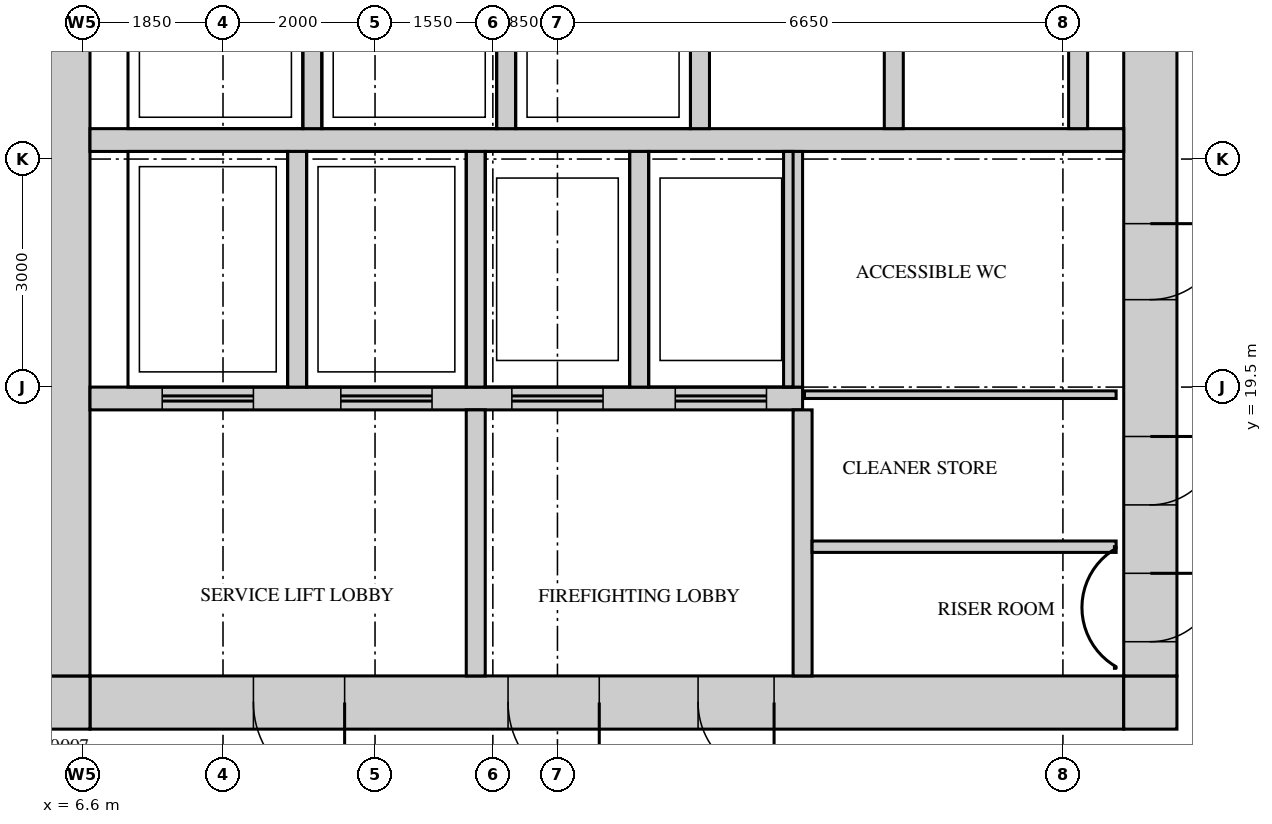
"""IFC4 building model, lengths in metres.
Left out: names, types, materials, properties, quantities, classifications, styles, units other than length and angle.
Written with IfcOpenShell. Run it as: python <this file> out.ifc"""

import sys

from ifc_helpers import new_model, si_unit, direction, frame, frame_2d, origin, place, context, subcontext, project, spatial, rectangle, extrude, source, transform, mapped, element, fill, save


model = new_model("IFC4")
c1 = context("Model", 3, precision=1e-05, world=origin(), true_north=direction((0.0, 1.0)))
c2 = subcontext(c1, "Body", "Model", "MODEL_VIEW")
j1 = project(units=[si_unit("LENGTHUNIT", "METRE"), si_unit("PLANEANGLEUNIT", "RADIAN")], contexts=[c1])
p1 = place(None, origin())
s1 = spatial("IfcSite", under=j1, at=p1, CompositionType="ELEMENT")
p2 = place(p1, origin())
s2 = spatial("IfcBuilding", under=s1, at=p2, CompositionType="ELEMENT")
p3 = place(p2, frame((0.0, 0.0, 262.2)))
s3 = spatial("IfcBuildingStorey", under=s2, at=p3, CompositionType="ELEMENT", Elevation=262.2)
m1 = source(origin(), c2, "Body", "SweptSolid", [
    extrude(rectangle(XDim=13.6, YDim=0.7, at=frame_2d((6.8, 0.0))), origin(), (0.0, 0.0, 1.0), 3.75),
])
p4 = place(p3, frame((6.7, 15.35, 0.0), z_axis=(0.0, 0.0, 1.0), x_axis=(1.0, 0.0, 0.0)))
e1 = element("IfcWall", 1, at=p4, inside=s3, PredefinedType="SHEAR", context=c2, shape_type="MappedRepresentation", body=[
    mapped(m1, transform((0.0, 0.0, 0.0))),
])
m2 = source(origin(), c2, "Body", "SweptSolid", [
    extrude(rectangle(XDim=1.2, YDim=2.1, at=frame_2d((0.6, 1.05))), frame((0.0, 0.36, 0.0), z_axis=(0.0, -1.0, 0.0), x_axis=(1.0, 0.0, 0.0)), (0.0, 0.0, 1.0), 0.72),
])
p5 = place(p4, frame((5.5, 0.0, 0.0)))
e2 = element("IfcOpeningElement", 2, at=p5, cuts=e1, PredefinedType="OPENING", context=c2, shape_type="MappedRepresentation", body=[
    mapped(m2, transform((0.0, 0.0, 0.0))),
])
p6 = place(p4, frame((2.15, 0.0, 0.0)))
e3 = element("IfcOpeningElement", 3, at=p6, cuts=e1, PredefinedType="OPENING", context=c2, shape_type="MappedRepresentation", body=[
    mapped(m2, transform((0.0, 0.0, 0.0))),
])
m3 = source(origin(), c2, "Body", "SweptSolid", [
    extrude(rectangle(XDim=1.0, YDim=2.1, at=frame_2d((0.5, 1.05))), frame((0.0, 0.36, 0.0), z_axis=(0.0, -1.0, 0.0), x_axis=(1.0, 0.0, 0.0)), (0.0, 0.0, 1.0), 0.72),
])
p7 = place(p4, frame((8.0, 0.0, 0.0)))
e4 = element("IfcOpeningElement", 4, at=p7, cuts=e1, PredefinedType="OPENING", context=c2, shape_type="MappedRepresentation", body=[
    mapped(m3, transform((0.0, 0.0, 0.0))),
])
m4 = source(origin(), c2, "Body", "SweptSolid", [
    extrude(rectangle(XDim=0.7, YDim=0.7, at=frame_2d((0.35, 0.0))), origin(), (0.0, 0.0, 1.0), 3.75),
])
for number, where, z_axis, x_axis in (
    (5, (20.3, 15.35, 0.0), (0.0, 0.0, 1.0), (1.0, 0.0, 0.0)),
    (6, (6.0, 15.35, 0.0), (0.0, 0.0, 1.0), (1.0, 0.0, 0.0)),
):
    element("IfcWall", number, at=place(p3, frame(where, z_axis=z_axis, x_axis=x_axis)), inside=s3, PredefinedType="SHEAR", context=c2, shape_type="MappedRepresentation", body=[
        mapped(m4, transform((0.0, 0.0, 0.0))),
    ])
m5 = source(origin(), c2, "Body", "SweptSolid", [
    extrude(rectangle(XDim=22.6, YDim=0.7, at=frame_2d((11.3, 0.0))), origin(), (0.0, 0.0, 1.0), 3.75),
])
p8 = place(p3, frame((20.65, 15.7, 0.0), z_axis=(0.0, 0.0, 1.0), x_axis=(0.0, 1.0, 0.0)))
e7 = element("IfcWall", 7, at=p8, inside=s3, PredefinedType="SHEAR", context=c2, shape_type="MappedRepresentation", body=[
    mapped(m5, transform((0.0, 0.0, 0.0))),
])
m6 = source(origin(), c2, "Body", "SweptSolid", [
    extrude(rectangle(XDim=1.8, YDim=2.1, at=frame_2d((0.9, 1.05))), frame((0.0, 0.36, 0.0), z_axis=(0.0, -1.0, 0.0), x_axis=(1.0, 0.0, 0.0)), (0.0, 0.0, 1.0), 0.72),
])
p9 = place(p8, frame((10.8, 0.0, 0.0)))
e8 = element("IfcOpeningElement", 8, at=p9, cuts=e7, PredefinedType="OPENING", context=c2, shape_type="MappedRepresentation", body=[
    mapped(m6, transform((0.0, 0.0, 0.0))),
])
m7 = source(origin(), c2, "Body", "SweptSolid", [
    extrude(rectangle(XDim=0.9, YDim=2.1, at=frame_2d((0.45, 1.05))), frame((0.0, 0.36, 0.0), z_axis=(0.0, -1.0, 0.0), x_axis=(1.0, 0.0, 0.0)), (0.0, 0.0, 1.0), 0.72),
])
p10 = place(p8, frame((0.45, 0.0, 0.0)))
e9 = element("IfcOpeningElement", 9, at=p10, cuts=e7, PredefinedType="OPENING", context=c2, shape_type="MappedRepresentation", body=[
    mapped(m7, transform((0.0, 0.0, 0.0))),
])
p11 = place(p8, frame((2.25, 0.0, 0.0)))
e10 = element("IfcOpeningElement", 10, at=p11, cuts=e7, PredefinedType="OPENING", context=c2, shape_type="MappedRepresentation", body=[
    mapped(m7, transform((0.0, 0.0, 0.0))),
])
p12 = place(p8, frame((4.95, 0.0, 0.0)))
e11 = element("IfcOpeningElement", 11, at=p12, cuts=e7, PredefinedType="OPENING", context=c2, shape_type="MappedRepresentation", body=[
    mapped(m3, transform((0.0, 0.0, 0.0))),
])
p13 = place(p3, frame((6.35, 15.7, 0.0), z_axis=(0.0, 0.0, 1.0), x_axis=(0.0, 1.0, 0.0)))
e12 = element("IfcWall", 12, at=p13, inside=s3, PredefinedType="SHEAR", context=c2, shape_type="MappedRepresentation", body=[
    mapped(m5, transform((0.0, 0.0, 0.0))),
])
m8 = source(origin(), c2, "Body", "SweptSolid", [
    extrude(rectangle(XDim=13.6, YDim=0.3, at=frame_2d((6.8, 0.0))), origin(), (0.0, 0.0, 1.0), 3.75),
])
p14 = place(p3, frame((6.7, 22.75, 0.0), z_axis=(0.0, 0.0, 1.0), x_axis=(1.0, 0.0, 0.0)))
e13 = element("IfcWall", 13, at=p14, inside=s3, PredefinedType="STANDARD", context=c2, shape_type="MappedRepresentation", body=[
    mapped(m8, transform((0.0, 0.0, 0.0))),
])
m9 = source(origin(), c2, "Body", "SweptSolid", [
    extrude(rectangle(XDim=9.375, YDim=0.3, at=frame_2d((4.688, 0.0))), origin(), (0.0, 0.0, 1.0), 3.75),
])
p15 = place(p3, frame((6.7, 19.35, 0.0), z_axis=(0.0, 0.0, 1.0), x_axis=(1.0, 0.0, 0.0)))
e14 = element("IfcWall", 14, at=p15, inside=s3, PredefinedType="STANDARD", context=c2, shape_type="MappedRepresentation", body=[
    mapped(m9, transform((0.0, 0.0, 0.0))),
])
m10 = source(origin(), c2, "Body", "SweptSolid", [
    extrude(rectangle(XDim=1.2, YDim=2.1, at=frame_2d((0.6, 1.05))), frame((0.0, 0.16, 0.0), z_axis=(0.0, -1.0, 0.0), x_axis=(1.0, 0.0, 0.0)), (0.0, 0.0, 1.0), 0.32),
])
p16 = place(p15, frame((0.95, 0.0, 0.0)))
e15 = element("IfcOpeningElement", 15, at=p16, cuts=e14, PredefinedType="OPENING", context=c2, shape_type="MappedRepresentation", body=[
    mapped(m10, transform((0.0, 0.0, 0.0))),
])
p17 = place(p15, frame((3.3, 0.0, 0.0)))
e16 = element("IfcOpeningElement", 16, at=p17, cuts=e14, PredefinedType="OPENING", context=c2, shape_type="MappedRepresentation", body=[
    mapped(m10, transform((0.0, 0.0, 0.0))),
])
p18 = place(p15, frame((5.55, 0.0, 0.0)))
e17 = element("IfcOpeningElement", 17, at=p18, cuts=e14, PredefinedType="OPENING", context=c2, shape_type="MappedRepresentation", body=[
    mapped(m10, transform((0.0, 0.0, 0.0))),
])
p19 = place(p15, frame((7.7, 0.0, 0.0)))
e18 = element("IfcOpeningElement", 18, at=p19, cuts=e14, PredefinedType="OPENING", context=c2, shape_type="MappedRepresentation", body=[
    mapped(m10, transform((0.0, 0.0, 0.0))),
])
m11 = source(origin(), c2, "Body", "SweptSolid", [
    extrude(rectangle(XDim=3.1, YDim=0.25, at=frame_2d((1.55, 0.0))), origin(), (0.0, 0.0, 1.0), 3.75),
])
for number, where, z_axis, x_axis in (
    (19, (9.425, 19.5, 0.0), (0.0, 0.0, 1.0), (0.0, 1.0, 0.0)),
    (20, (11.775, 19.5, 0.0), (0.0, 0.0, 1.0), (0.0, 1.0, 0.0)),
    (21, (13.925, 19.5, 0.0), (0.0, 0.0, 1.0), (0.0, 1.0, 0.0)),
    (22, (15.95, 19.5, 0.0), (0.0, 0.0, 1.0), (0.0, 1.0, 0.0)),
):
    element("IfcWall", number, at=place(p3, frame(where, z_axis=z_axis, x_axis=x_axis)), inside=s3, PredefinedType="STANDARD", context=c2, shape_type="MappedRepresentation", body=[
        mapped(m11, transform((0.0, 0.0, 0.0))),
    ])
m12 = source(origin(), c2, "Body", "SweptSolid", [
    extrude(rectangle(XDim=2.4, YDim=0.25, at=frame_2d((1.2, 0.0))), origin(), (0.0, 0.0, 1.0), 3.75),
])
for number, where, z_axis, x_axis in (
    (23, (17.275, 22.9, 0.0), (0.0, 0.0, 1.0), (0.0, 1.0, 0.0)),
    (24, (19.7, 22.9, 0.0), (0.0, 0.0, 1.0), (0.0, 1.0, 0.0)),
    (25, (9.625, 22.9, 0.0), (0.0, 0.0, 1.0), (0.0, 1.0, 0.0)),
    (26, (12.175, 22.9, 0.0), (0.0, 0.0, 1.0), (0.0, 1.0, 0.0)),
    (27, (14.725, 22.9, 0.0), (0.0, 0.0, 1.0), (0.0, 1.0, 0.0)),
):
    element("IfcWall", number, at=place(p3, frame(where, z_axis=z_axis, x_axis=x_axis)), inside=s3, PredefinedType="STANDARD", context=c2, shape_type="MappedRepresentation", body=[
        mapped(m12, transform((0.0, 0.0, 0.0))),
    ])
m13 = source(origin(), c2, "Body", "SweptSolid", [
    extrude(rectangle(XDim=3.5, YDim=0.25, at=frame_2d((1.75, 0.0))), origin(), (0.0, 0.0, 1.0), 3.75),
])
for number, where, z_axis, x_axis in (
    (28, (16.075, 15.7, 0.0), (0.0, 0.0, 1.0), (0.0, 1.0, 0.0)),
    (29, (11.775, 15.7, 0.0), (0.0, 0.0, 1.0), (0.0, 1.0, 0.0)),
):
    element("IfcWall", number, at=place(p3, frame(where, z_axis=z_axis, x_axis=x_axis)), inside=s3, PredefinedType="STANDARD", context=c2, shape_type="MappedRepresentation", body=[
        mapped(m13, transform((0.0, 0.0, 0.0))),
    ])
m14 = source(origin(), c2, "Body", "SweptSolid", [
    extrude(rectangle(XDim=4.0, YDim=0.15, at=frame_2d((2.0, 0.0))), origin(), (0.0, 0.0, 1.0), 3.8),
])
p20 = place(p3, frame((16.2, 17.4, 0.0), z_axis=(0.0, 0.0, 1.0), x_axis=(1.0, 0.0, 0.0)))
e30 = element("IfcWall", 30, at=p20, inside=s3, PredefinedType="PARTITIONING", context=c2, shape_type="MappedRepresentation", body=[
    mapped(m14, transform((0.0, 0.0, 0.0))),
])
m15 = source(origin(), c2, "Body", "SweptSolid", [
    extrude(rectangle(XDim=4.1, YDim=0.1, at=frame_2d((2.05, 0.0))), origin(), (0.0, 0.0, 1.0), 3.8),
])
p21 = place(p3, frame((16.1, 19.4, 0.0), z_axis=(0.0, 0.0, 1.0), x_axis=(1.0, 0.0, 0.0)))
e31 = element("IfcWall", 31, at=p21, inside=s3, PredefinedType="PARTITIONING", context=c2, shape_type="MappedRepresentation", body=[
    mapped(m15, transform((0.0, 0.0, 0.0))),
])
m16 = source(origin(), c2, "Body", "SweptSolid", [
    extrude(rectangle(XDim=0.9, YDim=2.1, at=frame_2d((0.45, 1.05))), frame((0.0, 0.3, 0.0), z_axis=(0.0, -1.0, 0.0), x_axis=(1.0, 0.0, 0.0)), (0.0, 0.0, 1.0), 0.6),
])
p22 = place(p10, origin())
e32 = element("IfcDoor", 32, at=p22, inside=s3, OperationType="SINGLE_SWING_RIGHT", PredefinedType="DOOR", context=c2, shape_type="MappedRepresentation", body=[
    mapped(m16, transform((0.0, 0.0, 0.0))),
])
fill(e9, e32)
p23 = place(p11, origin())
e33 = element("IfcDoor", 33, at=p23, inside=s3, OperationType="SINGLE_SWING_RIGHT", PredefinedType="DOOR", context=c2, shape_type="MappedRepresentation", body=[
    mapped(m16, transform((0.0, 0.0, 0.0))),
])
fill(e10, e33)
m17 = source(origin(), c2, "Body", "SweptSolid", [
    extrude(rectangle(XDim=1.0, YDim=2.1, at=frame_2d((0.5, 1.05))), frame((0.0, 0.3, 0.0), z_axis=(0.0, -1.0, 0.0), x_axis=(1.0, 0.0, 0.0)), (0.0, 0.0, 1.0), 0.6),
])
p24 = place(p12, origin())
e34 = element("IfcDoor", 34, at=p24, inside=s3, OperationType="SINGLE_SWING_RIGHT", PredefinedType="DOOR", context=c2, shape_type="MappedRepresentation", body=[
    mapped(m17, transform((0.0, 0.0, 0.0))),
])
fill(e11, e34)
m18 = source(origin(), c2, "Body", "SweptSolid", [
    extrude(rectangle(XDim=1.2, YDim=2.1, at=frame_2d((0.6, 1.05))), frame((0.0, 0.3, 0.0), z_axis=(0.0, -1.0, 0.0), x_axis=(1.0, 0.0, 0.0)), (0.0, 0.0, 1.0), 0.6),
])
p25 = place(p5, origin())
e35 = element("IfcDoor", 35, at=p25, inside=s3, OperationType="SINGLE_SWING_RIGHT", PredefinedType="DOOR", context=c2, shape_type="MappedRepresentation", body=[
    mapped(m18, transform((0.0, 0.0, 0.0))),
])
fill(e2, e35)
p26 = place(p6, origin())
e36 = element("IfcDoor", 36, at=p26, inside=s3, OperationType="SINGLE_SWING_RIGHT", PredefinedType="DOOR", context=c2, shape_type="MappedRepresentation", body=[
    mapped(m18, transform((0.0, 0.0, 0.0))),
])
fill(e3, e36)
p27 = place(p7, origin())
e37 = element("IfcDoor", 37, at=p27, inside=s3, OperationType="SINGLE_SWING_RIGHT", PredefinedType="DOOR", context=c2, shape_type="MappedRepresentation", body=[
    mapped(m17, transform((0.0, 0.0, 0.0))),
])
fill(e4, e37)
m19 = source(origin(), c2, "Body", "SweptSolid", [
    extrude(rectangle(XDim=1.2, YDim=2.1, at=frame_2d((0.6, 1.05))), frame((0.0, 0.025, 0.0), z_axis=(0.0, -1.0, 0.0), x_axis=(1.0, 0.0, 0.0)), (0.0, 0.0, 1.0), 0.05),
])
p28 = place(p16, origin())
e38 = element("IfcDoor", 38, at=p28, inside=s3, OperationType="DOUBLE_DOOR_SLIDING", PredefinedType="DOOR", context=c2, shape_type="MappedRepresentation", body=[
    mapped(m19, transform((0.0, 0.0, 0.0))),
])
fill(e15, e38)
p29 = place(p17, origin())
e39 = element("IfcDoor", 39, at=p29, inside=s3, OperationType="DOUBLE_DOOR_SLIDING", PredefinedType="DOOR", context=c2, shape_type="MappedRepresentation", body=[
    mapped(m19, transform((0.0, 0.0, 0.0))),
])
fill(e16, e39)
p30 = place(p18, origin())
e40 = element("IfcDoor", 40, at=p30, inside=s3, OperationType="DOUBLE_DOOR_SLIDING", PredefinedType="DOOR", context=c2, shape_type="MappedRepresentation", body=[
    mapped(m19, transform((0.0, 0.0, 0.0))),
])
fill(e17, e40)
p31 = place(p19, origin())
e41 = element("IfcDoor", 41, at=p31, inside=s3, OperationType="DOUBLE_DOOR_SLIDING", PredefinedType="DOOR", context=c2, shape_type="MappedRepresentation", body=[
    mapped(m19, transform((0.0, 0.0, 0.0))),
])
fill(e18, e41)
save(model, sys.argv[1])
